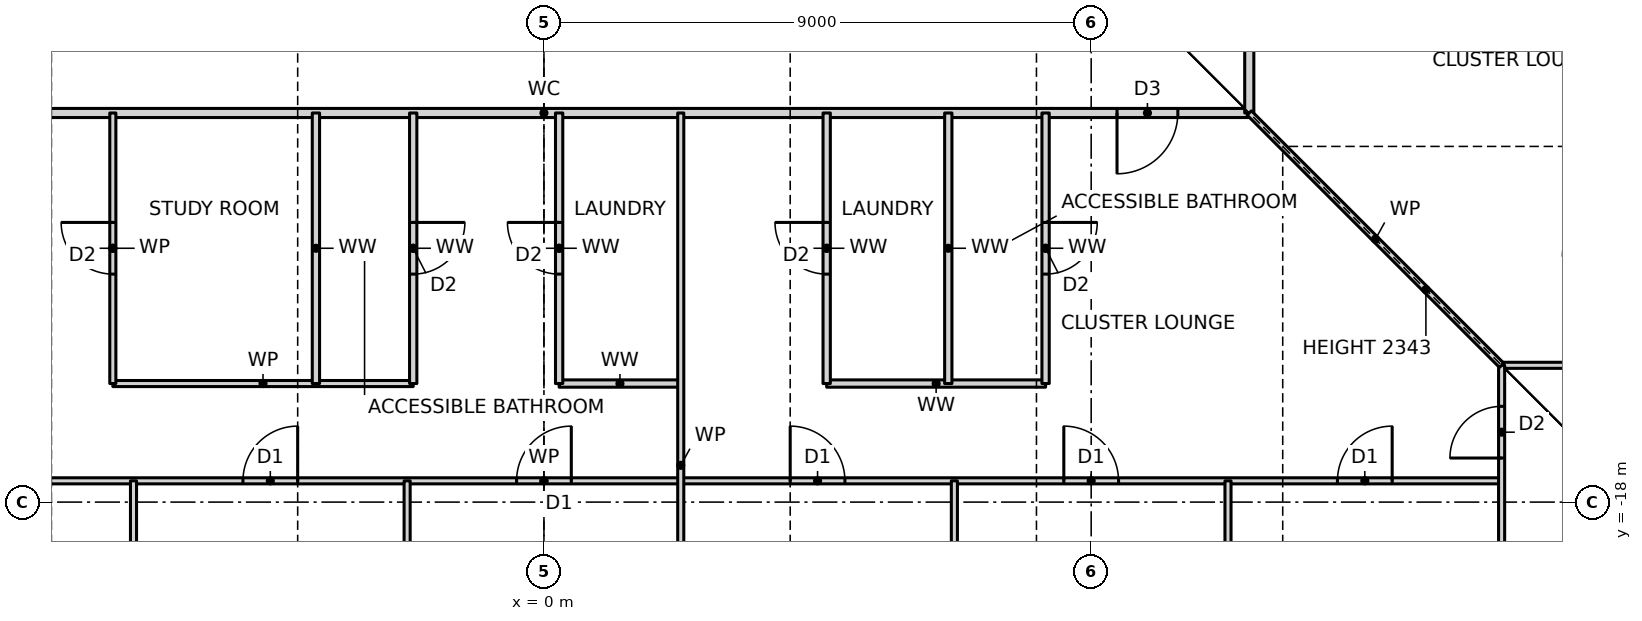
"""IFC4 building model, lengths in metres.
Left out: names, types, materials, properties, quantities, classifications, styles, units other than length and angle.
Written with IfcOpenShell. Run it as: python <this file> out.ifc"""

import sys

from ifc_helpers import new_model, si_unit, direction, frame, frame_2d, origin, place, context, subcontext, project, spatial, rectangle, extrude, element, fill, save


model = new_model("IFC4")
c1 = context("Model", 3, precision=1e-05, world=origin(), true_north=direction((0.0, 1.0)))
c2 = subcontext(c1, "Body", "Model", "MODEL_VIEW")
j1 = project(units=[si_unit("LENGTHUNIT", "METRE"), si_unit("PLANEANGLEUNIT", "RADIAN")], contexts=[c1])
p1 = place(None, origin())
s1 = spatial("IfcSite", under=j1, at=p1, CompositionType="ELEMENT")
p2 = place(p1, origin())
s2 = spatial("IfcBuilding", under=s1, at=p2, CompositionType="ELEMENT")
p3 = place(p2, frame((0.0, 0.0, 57.0)))
s3 = spatial("IfcBuildingStorey", under=s2, at=p3, CompositionType="ELEMENT", Elevation=57.0)
p4 = place(p3, frame((-15.75, -17.65, 0.0), z_axis=(0.0, 0.0, 1.0), x_axis=(1.0, 0.0, 0.0)))
e1 = element("IfcWall", 1, at=p4, inside=s3, PredefinedType="PARTITIONING", context=c2, shape_type="SweptSolid", body=[
    extrude(rectangle(XDim=31.5, YDim=0.1, at=frame_2d((15.75, 0.0))), origin(), (0.0, 0.0, 1.0), 3.27),
])
p5 = place(p4, frame((1.8, 0.0, 0.0)))
e2 = element("IfcOpeningElement", 2, at=p5, cuts=e1, PredefinedType="OPENING", context=c2, shape_type="SweptSolid", body=[
    extrude(rectangle(XDim=0.9, YDim=2.1, at=frame_2d((0.45, 1.05))), frame((0.0, 0.06, 0.0), z_axis=(0.0, -1.0, 0.0), x_axis=(1.0, 0.0, 0.0)), (0.0, 0.0, 1.0), 0.12),
])
p6 = place(p4, frame((6.3, 0.0, 0.0)))
e3 = element("IfcOpeningElement", 3, at=p6, cuts=e1, PredefinedType="OPENING", context=c2, shape_type="SweptSolid", body=[
    extrude(rectangle(XDim=0.9, YDim=2.1, at=frame_2d((0.45, 1.05))), frame((0.0, 0.06, 0.0), z_axis=(0.0, -1.0, 0.0), x_axis=(1.0, 0.0, 0.0)), (0.0, 0.0, 1.0), 0.12),
])
p7 = place(p4, frame((10.8, 0.0, 0.0)))
e4 = element("IfcOpeningElement", 4, at=p7, cuts=e1, PredefinedType="OPENING", context=c2, shape_type="SweptSolid", body=[
    extrude(rectangle(XDim=0.9, YDim=2.1, at=frame_2d((0.45, 1.05))), frame((0.0, 0.06, 0.0), z_axis=(0.0, -1.0, 0.0), x_axis=(1.0, 0.0, 0.0)), (0.0, 0.0, 1.0), 0.12),
])
p8 = place(p4, frame((15.3, 0.0, 0.0)))
e5 = element("IfcOpeningElement", 5, at=p8, cuts=e1, PredefinedType="OPENING", context=c2, shape_type="SweptSolid", body=[
    extrude(rectangle(XDim=0.9, YDim=2.1, at=frame_2d((0.45, 1.05))), frame((0.0, 0.06, 0.0), z_axis=(0.0, -1.0, 0.0), x_axis=(1.0, 0.0, 0.0)), (0.0, 0.0, 1.0), 0.12),
])
p9 = place(p4, frame((19.8, 0.0, 0.0)))
e6 = element("IfcOpeningElement", 6, at=p9, cuts=e1, PredefinedType="OPENING", context=c2, shape_type="SweptSolid", body=[
    extrude(rectangle(XDim=0.9, YDim=2.1, at=frame_2d((0.45, 1.05))), frame((0.0, 0.06, 0.0), z_axis=(0.0, -1.0, 0.0), x_axis=(1.0, 0.0, 0.0)), (0.0, 0.0, 1.0), 0.12),
])
p10 = place(p4, frame((24.3, 0.0, 0.0)))
e7 = element("IfcOpeningElement", 7, at=p10, cuts=e1, PredefinedType="OPENING", context=c2, shape_type="SweptSolid", body=[
    extrude(rectangle(XDim=0.9, YDim=2.1, at=frame_2d((0.45, 1.05))), frame((0.0, 0.06, 0.0), z_axis=(0.0, -1.0, 0.0), x_axis=(1.0, 0.0, 0.0)), (0.0, 0.0, 1.0), 0.12),
])
p11 = place(p4, frame((28.8, 0.0, 0.0)))
e8 = element("IfcOpeningElement", 8, at=p11, cuts=e1, PredefinedType="OPENING", context=c2, shape_type="SweptSolid", body=[
    extrude(rectangle(XDim=0.9, YDim=2.1, at=frame_2d((0.45, 1.05))), frame((0.0, 0.06, 0.0), z_axis=(0.0, -1.0, 0.0), x_axis=(1.0, 0.0, 0.0)), (0.0, 0.0, 1.0), 0.12),
])
p12 = place(p3, frame((-7.09, -16.05, 0.0), z_axis=(0.0, 0.0, 1.0), x_axis=(1.0, 0.0, 0.0)))
e9 = element("IfcWall", 9, at=p12, inside=s3, PredefinedType="PARTITIONING", context=c2, shape_type="SweptSolid", body=[
    extrude(rectangle(XDim=4.94, YDim=0.1, at=frame_2d((2.47, 0.0))), origin(), (0.0, 0.0, 1.0), 3.27),
])
p13 = place(p3, frame((0.25, -16.05, 0.0), z_axis=(0.0, 0.0, 1.0), x_axis=(1.0, 0.0, 0.0)))
e10 = element("IfcWall", 10, at=p13, inside=s3, PredefinedType="PARTITIONING", context=c2, shape_type="SweptSolid", body=[
    extrude(rectangle(XDim=2.0, YDim=0.12, at=frame_2d((1.0, 0.0))), origin(), (0.0, 0.0, 1.0), 3.27),
])
p14 = place(p3, frame((4.65, -16.05, 0.0), z_axis=(0.0, 0.0, 1.0), x_axis=(1.0, 0.0, 0.0)))
e11 = element("IfcWall", 11, at=p14, inside=s3, PredefinedType="PARTITIONING", context=c2, shape_type="SweptSolid", body=[
    extrude(rectangle(XDim=3.6, YDim=0.12, at=frame_2d((1.8, 0.0))), origin(), (0.0, 0.0, 1.0), 3.27),
])
p15 = place(p3, frame((15.75, -15.75, 0.0), z_axis=(0.0, 0.0, 1.0), x_axis=(1.0, 0.0, 0.0)))
e12 = element("IfcWall", 12, at=p15, inside=s3, PredefinedType="PARTITIONING", context=c2, shape_type="SweptSolid", body=[
    extrude(rectangle(XDim=7.44, YDim=0.1, at=frame_2d((3.72, 0.0))), origin(), (0.0, 0.0, 1.0), 3.27),
])
p16 = place(p3, frame((-11.6, -11.6, 0.0), z_axis=(0.0, 0.0, 1.0), x_axis=(1.0, 0.0, 0.0)))
e13 = element("IfcWall", 13, at=p16, inside=s3, PredefinedType="PARTITIONING", context=c2, shape_type="SweptSolid", body=[
    extrude(rectangle(XDim=23.2, YDim=0.15, at=frame_2d((11.6, 0.0))), origin(), (0.0, 0.0, 1.0), 3.27),
])
p17 = place(p16, frame((1.755, 0.0, 0.0)))
e14 = element("IfcOpeningElement", 14, at=p17, cuts=e13, PredefinedType="OPENING", context=c2, shape_type="SweptSolid", body=[
    extrude(rectangle(XDim=1.0, YDim=2.1, at=frame_2d((0.5, 1.05))), frame((0.0, 0.085, 0.0), z_axis=(0.0, -1.0, 0.0), x_axis=(1.0, 0.0, 0.0)), (0.0, 0.0, 1.0), 0.17),
])
p18 = place(p16, frame((21.025, 0.0, 0.0)))
e15 = element("IfcOpeningElement", 15, at=p18, cuts=e13, PredefinedType="OPENING", context=c2, shape_type="SweptSolid", body=[
    extrude(rectangle(XDim=1.0, YDim=2.1, at=frame_2d((0.5, 1.05))), frame((0.0, 0.085, 0.0), z_axis=(0.0, -1.0, 0.0), x_axis=(1.0, 0.0, 0.0)), (0.0, 0.0, 1.0), 0.17),
])
p19 = place(p3, frame((15.75, -23.19, 0.0), z_axis=(0.0, 0.0, 1.0), x_axis=(0.0, 1.0, 0.0)))
e16 = element("IfcWall", 16, at=p19, inside=s3, PredefinedType="PARTITIONING", context=c2, shape_type="SweptSolid", body=[
    extrude(rectangle(XDim=7.44, YDim=0.1, at=frame_2d((3.72, 0.0))), origin(), (0.0, 0.0, 1.0), 3.27),
])
p20 = place(p19, frame((5.915, 0.0, 0.0)))
e17 = element("IfcOpeningElement", 17, at=p20, cuts=e16, PredefinedType="OPENING", context=c2, shape_type="SweptSolid", body=[
    extrude(rectangle(XDim=0.85, YDim=2.1, at=frame_2d((0.425, 1.05))), frame((0.0, 0.06, 0.0), z_axis=(0.0, -1.0, 0.0), x_axis=(1.0, 0.0, 0.0)), (0.0, 0.0, 1.0), 0.12),
])
p21 = place(p3, frame((11.6, -11.6, 0.0), z_axis=(0.0, 0.0, 1.0), x_axis=(0.0, 1.0, 0.0)))
e18 = element("IfcWall", 18, at=p21, inside=s3, PredefinedType="PARTITIONING", context=c2, shape_type="SweptSolid", body=[
    extrude(rectangle(XDim=24.2, YDim=0.15, at=frame_2d((12.1, 0.0))), origin(), (0.0, 0.0, 1.0), 3.27),
])
p22 = place(p21, frame((16.05, 0.0, 0.0)))
e19 = element("IfcOpeningElement", 19, at=p22, cuts=e18, PredefinedType="OPENING", context=c2, shape_type="SweptSolid", body=[
    extrude(rectangle(XDim=1.0, YDim=2.1, at=frame_2d((0.5, 1.05))), frame((0.0, 0.085, 0.0), z_axis=(0.0, -1.0, 0.0), x_axis=(1.0, 0.0, 0.0)), (0.0, 0.0, 1.0), 0.17),
])
p23 = place(p3, frame((11.25, -23.19, 0.0), z_axis=(0.0, 0.0, 1.0), x_axis=(0.0, 1.0, 0.0)))
e20 = element("IfcWall", 20, at=p23, inside=s3, PredefinedType="PARTITIONING", context=c2, shape_type="SweptSolid", body=[
    extrude(rectangle(XDim=5.54, YDim=0.1, at=frame_2d((2.77, 0.0))), origin(), (0.0, 0.0, 1.0), 3.27),
])
p24 = place(p3, frame((8.25, -16.05, 0.0), z_axis=(0.0, 0.0, 1.0), x_axis=(0.0, 1.0, 0.0)))
e21 = element("IfcWall", 21, at=p24, inside=s3, PredefinedType="PARTITIONING", context=c2, shape_type="SweptSolid", body=[
    extrude(rectangle(XDim=4.45, YDim=0.12, at=frame_2d((2.225, 0.0))), origin(), (0.0, 0.0, 1.0), 3.27),
])
p25 = place(p24, frame((1.8, 0.0, 0.0)))
e22 = element("IfcOpeningElement", 22, at=p25, cuts=e21, PredefinedType="OPENING", context=c2, shape_type="SweptSolid", body=[
    extrude(rectangle(XDim=0.85, YDim=2.1, at=frame_2d((0.425, 1.05))), frame((0.0, 0.07, 0.0), z_axis=(0.0, -1.0, 0.0), x_axis=(1.0, 0.0, 0.0)), (0.0, 0.0, 1.0), 0.14),
])
p26 = place(p3, frame((6.75, -23.19, 0.0), z_axis=(0.0, 0.0, 1.0), x_axis=(0.0, 1.0, 0.0)))
e23 = element("IfcWall", 23, at=p26, inside=s3, PredefinedType="PARTITIONING", context=c2, shape_type="SweptSolid", body=[
    extrude(rectangle(XDim=5.54, YDim=0.1, at=frame_2d((2.77, 0.0))), origin(), (0.0, 0.0, 1.0), 3.27),
])
p27 = place(p3, frame((6.65, -16.05, 0.0), z_axis=(0.0, 0.0, 1.0), x_axis=(0.0, 1.0, 0.0)))
e24 = element("IfcWall", 24, at=p27, inside=s3, PredefinedType="PARTITIONING", context=c2, shape_type="SweptSolid", body=[
    extrude(rectangle(XDim=4.45, YDim=0.12, at=frame_2d((2.225, 0.0))), origin(), (0.0, 0.0, 1.0), 3.27),
])
p28 = place(p3, frame((4.65, -16.05, 0.0), z_axis=(0.0, 0.0, 1.0), x_axis=(0.0, 1.0, 0.0)))
e25 = element("IfcWall", 25, at=p28, inside=s3, PredefinedType="PARTITIONING", context=c2, shape_type="SweptSolid", body=[
    extrude(rectangle(XDim=4.45, YDim=0.12, at=frame_2d((2.225, 0.0))), origin(), (0.0, 0.0, 1.0), 3.27),
])
p29 = place(p28, frame((1.8, 0.0, 0.0)))
e26 = element("IfcOpeningElement", 26, at=p29, cuts=e25, PredefinedType="OPENING", context=c2, shape_type="SweptSolid", body=[
    extrude(rectangle(XDim=0.85, YDim=2.1, at=frame_2d((0.425, 1.05))), frame((0.0, 0.07, 0.0), z_axis=(0.0, -1.0, 0.0), x_axis=(1.0, 0.0, 0.0)), (0.0, 0.0, 1.0), 0.14),
])
p30 = place(p3, frame((2.25, -23.19, 0.0), z_axis=(0.0, 0.0, 1.0), x_axis=(0.0, 1.0, 0.0)))
e27 = element("IfcWall", 27, at=p30, inside=s3, PredefinedType="PARTITIONING", context=c2, shape_type="SweptSolid", body=[
    extrude(rectangle(XDim=11.59, YDim=0.1, at=frame_2d((5.795, 0.0))), origin(), (0.0, 0.0, 1.0), 3.27),
])
p31 = place(p3, frame((0.25, -16.05, 0.0), z_axis=(0.0, 0.0, 1.0), x_axis=(0.0, 1.0, 0.0)))
e28 = element("IfcWall", 28, at=p31, inside=s3, PredefinedType="PARTITIONING", context=c2, shape_type="SweptSolid", body=[
    extrude(rectangle(XDim=4.45, YDim=0.12, at=frame_2d((2.225, 0.0))), origin(), (0.0, 0.0, 1.0), 3.27),
])
p32 = place(p31, frame((1.8, 0.0, 0.0)))
e29 = element("IfcOpeningElement", 29, at=p32, cuts=e28, PredefinedType="OPENING", context=c2, shape_type="SweptSolid", body=[
    extrude(rectangle(XDim=0.85, YDim=2.1, at=frame_2d((0.425, 1.05))), frame((0.0, 0.07, 0.0), z_axis=(0.0, -1.0, 0.0), x_axis=(1.0, 0.0, 0.0)), (0.0, 0.0, 1.0), 0.14),
])
p33 = place(p3, frame((-2.15, -16.05, 0.0), z_axis=(0.0, 0.0, 1.0), x_axis=(0.0, 1.0, 0.0)))
e30 = element("IfcWall", 30, at=p33, inside=s3, PredefinedType="PARTITIONING", context=c2, shape_type="SweptSolid", body=[
    extrude(rectangle(XDim=4.45, YDim=0.12, at=frame_2d((2.225, 0.0))), origin(), (0.0, 0.0, 1.0), 3.27),
])
p34 = place(p33, frame((1.8, 0.0, 0.0)))
e31 = element("IfcOpeningElement", 31, at=p34, cuts=e30, PredefinedType="OPENING", context=c2, shape_type="SweptSolid", body=[
    extrude(rectangle(XDim=0.85, YDim=2.1, at=frame_2d((0.425, 1.05))), frame((0.0, 0.07, 0.0), z_axis=(0.0, -1.0, 0.0), x_axis=(1.0, 0.0, 0.0)), (0.0, 0.0, 1.0), 0.14),
])
p35 = place(p3, frame((-2.25, -23.19, 0.0), z_axis=(0.0, 0.0, 1.0), x_axis=(0.0, 1.0, 0.0)))
e32 = element("IfcWall", 32, at=p35, inside=s3, PredefinedType="PARTITIONING", context=c2, shape_type="SweptSolid", body=[
    extrude(rectangle(XDim=5.54, YDim=0.1, at=frame_2d((2.77, 0.0))), origin(), (0.0, 0.0, 1.0), 3.27),
])
p36 = place(p3, frame((-3.75, -16.05, 0.0), z_axis=(0.0, 0.0, 1.0), x_axis=(0.0, 1.0, 0.0)))
e33 = element("IfcWall", 33, at=p36, inside=s3, PredefinedType="PARTITIONING", context=c2, shape_type="SweptSolid", body=[
    extrude(rectangle(XDim=4.45, YDim=0.12, at=frame_2d((2.225, 0.0))), origin(), (0.0, 0.0, 1.0), 3.27),
])
p37 = place(p3, frame((-6.75, -23.19, 0.0), z_axis=(0.0, 0.0, 1.0), x_axis=(0.0, 1.0, 0.0)))
e34 = element("IfcWall", 34, at=p37, inside=s3, PredefinedType="PARTITIONING", context=c2, shape_type="SweptSolid", body=[
    extrude(rectangle(XDim=5.54, YDim=0.1, at=frame_2d((2.77, 0.0))), origin(), (0.0, 0.0, 1.0), 3.27),
])
p38 = place(p3, frame((-7.09, -16.05, 0.0), z_axis=(0.0, 0.0, 1.0), x_axis=(0.0, 1.0, 0.0)))
e35 = element("IfcWall", 35, at=p38, inside=s3, PredefinedType="PARTITIONING", context=c2, shape_type="SweptSolid", body=[
    extrude(rectangle(XDim=4.45, YDim=0.1, at=frame_2d((2.225, 0.0))), origin(), (0.0, 0.0, 1.0), 3.27),
])
p39 = place(p38, frame((1.8, 0.0, 0.0)))
e36 = element("IfcOpeningElement", 36, at=p39, cuts=e35, PredefinedType="OPENING", context=c2, shape_type="SweptSolid", body=[
    extrude(rectangle(XDim=0.85, YDim=2.1, at=frame_2d((0.425, 1.05))), frame((0.0, 0.06, 0.0), z_axis=(0.0, -1.0, 0.0), x_axis=(1.0, 0.0, 0.0)), (0.0, 0.0, 1.0), 0.12),
])
p40 = place(p3, frame((15.75, -15.75, 0.0), z_axis=(0.0, 0.0, 1.0), x_axis=(-0.707106781187, 0.707106781187, 0.0)))
e37 = element("IfcWall", 37, at=p40, inside=s3, PredefinedType="PARTITIONING", context=c2, shape_type="SweptSolid", body=[
    extrude(rectangle(XDim=5.869, YDim=0.1, at=frame_2d((2.935, 0.0))), origin(), (0.0, 0.0, 1.0), 2.343),
])
p41 = place(p7, origin())
e38 = element("IfcDoor", 38, at=p41, inside=s3, OperationType="SINGLE_SWING_RIGHT", PredefinedType="DOOR", context=c2, shape_type="SweptSolid", body=[
    extrude(rectangle(XDim=0.9, YDim=2.1, at=frame_2d((0.45, 1.05))), frame((0.0, 0.025, 0.0), z_axis=(0.0, -1.0, 0.0), x_axis=(1.0, 0.0, 0.0)), (0.0, 0.0, 1.0), 0.05),
])
fill(e4, e38)
p42 = place(p8, origin())
e39 = element("IfcDoor", 39, at=p42, inside=s3, OperationType="SINGLE_SWING_RIGHT", PredefinedType="DOOR", context=c2, shape_type="SweptSolid", body=[
    extrude(rectangle(XDim=0.9, YDim=2.1, at=frame_2d((0.45, 1.05))), frame((0.0, 0.025, 0.0), z_axis=(0.0, -1.0, 0.0), x_axis=(1.0, 0.0, 0.0)), (0.0, 0.0, 1.0), 0.05),
])
fill(e5, e39)
p43 = place(p39, origin())
e40 = element("IfcDoor", 40, at=p43, inside=s3, OperationType="SINGLE_SWING_RIGHT", PredefinedType="DOOR", context=c2, shape_type="SweptSolid", body=[
    extrude(rectangle(XDim=0.85, YDim=2.1, at=frame_2d((0.425, 1.05))), frame((0.0, 0.025, 0.0), z_axis=(0.0, -1.0, 0.0), x_axis=(1.0, 0.0, 0.0)), (0.0, 0.0, 1.0), 0.05),
])
fill(e36, e40)
p44 = place(p34, frame((0.85, 0.0, 0.0), z_axis=(0.0, 0.0, 1.0), x_axis=(-1.0, 0.0, 0.0)))
e41 = element("IfcDoor", 41, at=p44, inside=s3, OperationType="SINGLE_SWING_LEFT", PredefinedType="DOOR", context=c2, shape_type="SweptSolid", body=[
    extrude(rectangle(XDim=0.85, YDim=2.1, at=frame_2d((0.425, 1.05))), frame((0.0, 0.025, 0.0), z_axis=(0.0, -1.0, 0.0), x_axis=(1.0, 0.0, 0.0)), (0.0, 0.0, 1.0), 0.05),
])
fill(e31, e41)
p45 = place(p32, origin())
e42 = element("IfcDoor", 42, at=p45, inside=s3, OperationType="SINGLE_SWING_RIGHT", PredefinedType="DOOR", context=c2, shape_type="SweptSolid", body=[
    extrude(rectangle(XDim=0.85, YDim=2.1, at=frame_2d((0.425, 1.05))), frame((0.0, 0.025, 0.0), z_axis=(0.0, -1.0, 0.0), x_axis=(1.0, 0.0, 0.0)), (0.0, 0.0, 1.0), 0.05),
])
fill(e29, e42)
p46 = place(p9, origin())
e43 = element("IfcDoor", 43, at=p46, inside=s3, OperationType="SINGLE_SWING_LEFT", PredefinedType="DOOR", context=c2, shape_type="SweptSolid", body=[
    extrude(rectangle(XDim=0.9, YDim=2.1, at=frame_2d((0.45, 1.05))), frame((0.0, 0.025, 0.0), z_axis=(0.0, -1.0, 0.0), x_axis=(1.0, 0.0, 0.0)), (0.0, 0.0, 1.0), 0.05),
])
fill(e6, e43)
p47 = place(p10, origin())
e44 = element("IfcDoor", 44, at=p47, inside=s3, OperationType="SINGLE_SWING_LEFT", PredefinedType="DOOR", context=c2, shape_type="SweptSolid", body=[
    extrude(rectangle(XDim=0.9, YDim=2.1, at=frame_2d((0.45, 1.05))), frame((0.0, 0.025, 0.0), z_axis=(0.0, -1.0, 0.0), x_axis=(1.0, 0.0, 0.0)), (0.0, 0.0, 1.0), 0.05),
])
fill(e7, e44)
p48 = place(p11, origin())
e45 = element("IfcDoor", 45, at=p48, inside=s3, OperationType="SINGLE_SWING_RIGHT", PredefinedType="DOOR", context=c2, shape_type="SweptSolid", body=[
    extrude(rectangle(XDim=0.9, YDim=2.1, at=frame_2d((0.45, 1.05))), frame((0.0, 0.025, 0.0), z_axis=(0.0, -1.0, 0.0), x_axis=(1.0, 0.0, 0.0)), (0.0, 0.0, 1.0), 0.05),
])
fill(e8, e45)
p49 = place(p18, frame((1.0, 0.0, 0.0), z_axis=(0.0, 0.0, 1.0), x_axis=(-1.0, 0.0, 0.0)))
e46 = element("IfcDoor", 46, at=p49, inside=s3, OperationType="SINGLE_SWING_RIGHT", PredefinedType="DOOR", context=c2, shape_type="SweptSolid", body=[
    extrude(rectangle(XDim=1.0, YDim=2.1, at=frame_2d((0.5, 1.05))), frame((0.0, 0.025, 0.0), z_axis=(0.0, -1.0, 0.0), x_axis=(1.0, 0.0, 0.0)), (0.0, 0.0, 1.0), 0.05),
])
fill(e15, e46)
p50 = place(p29, origin())
e47 = element("IfcDoor", 47, at=p50, inside=s3, OperationType="SINGLE_SWING_RIGHT", PredefinedType="DOOR", context=c2, shape_type="SweptSolid", body=[
    extrude(rectangle(XDim=0.85, YDim=2.1, at=frame_2d((0.425, 1.05))), frame((0.0, 0.025, 0.0), z_axis=(0.0, -1.0, 0.0), x_axis=(1.0, 0.0, 0.0)), (0.0, 0.0, 1.0), 0.05),
])
fill(e26, e47)
p51 = place(p25, frame((0.85, 0.0, 0.0), z_axis=(0.0, 0.0, 1.0), x_axis=(-1.0, 0.0, 0.0)))
e48 = element("IfcDoor", 48, at=p51, inside=s3, OperationType="SINGLE_SWING_LEFT", PredefinedType="DOOR", context=c2, shape_type="SweptSolid", body=[
    extrude(rectangle(XDim=0.85, YDim=2.1, at=frame_2d((0.425, 1.05))), frame((0.0, 0.025, 0.0), z_axis=(0.0, -1.0, 0.0), x_axis=(1.0, 0.0, 0.0)), (0.0, 0.0, 1.0), 0.05),
])
fill(e22, e48)
p52 = place(p20, origin())
e49 = element("IfcDoor", 49, at=p52, inside=s3, OperationType="SINGLE_SWING_LEFT", PredefinedType="DOOR", context=c2, shape_type="SweptSolid", body=[
    extrude(rectangle(XDim=0.85, YDim=2.1, at=frame_2d((0.425, 1.05))), frame((0.0, 0.025, 0.0), z_axis=(0.0, -1.0, 0.0), x_axis=(1.0, 0.0, 0.0)), (0.0, 0.0, 1.0), 0.05),
])
fill(e17, e49)
save(model, sys.argv[1])
